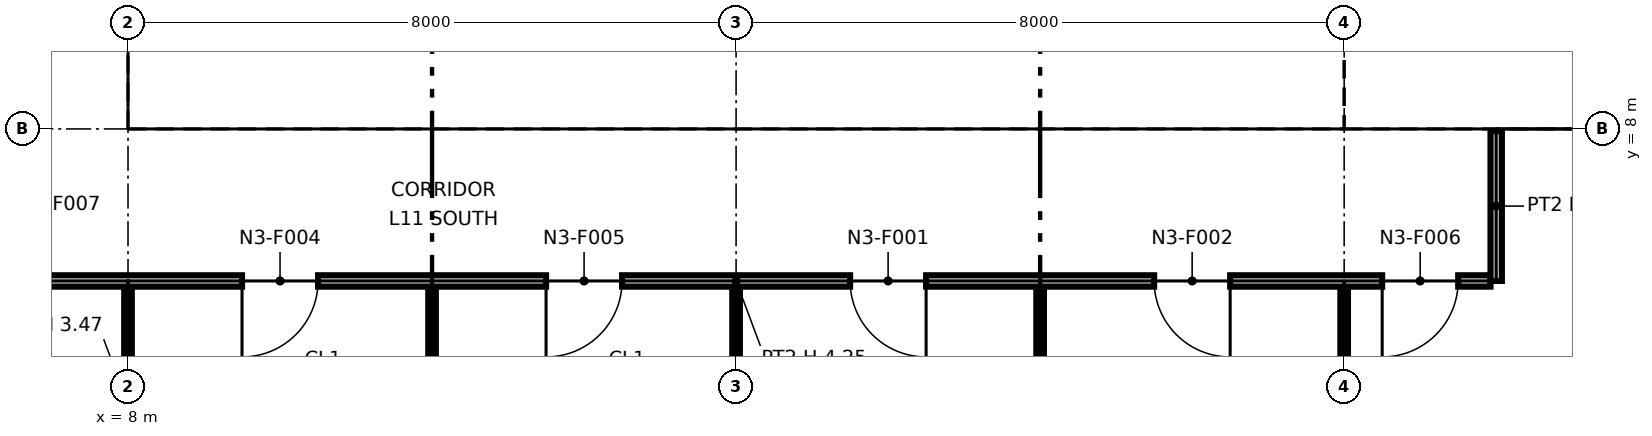
"""IFC4 building model, lengths in metres.
Left out: names, types, materials, properties, quantities, classifications, styles, units other than length and angle.
Written with IfcOpenShell. Run it as: python <this file> out.ifc"""

import sys

from ifc_helpers import new_model, si_unit, direction, frame, frame_2d, origin, origin_2d, place, context, subcontext, project, spatial, polyline, rectangle, i_section, outline, extrude, element, fill, save


model = new_model("IFC4")
c1 = context("Model", 3, precision=1e-05, world=origin(), true_north=direction((0.0, 1.0)))
c2 = subcontext(c1, "Body", "Model", "MODEL_VIEW")
j1 = project(units=[si_unit("LENGTHUNIT", "METRE"), si_unit("PLANEANGLEUNIT", "RADIAN")], contexts=[c1])
p1 = place(None, origin())
s1 = spatial("IfcSite", under=j1, at=p1, CompositionType="ELEMENT")
p2 = place(p1, origin())
s2 = spatial("IfcBuilding", under=s1, at=p2, CompositionType="ELEMENT")
p3 = place(p2, frame((0.0, 0.0, 65.6)))
s3 = spatial("IfcBuildingStorey", under=s2, at=p3, CompositionType="ELEMENT", Elevation=65.6)
for number, where, z_axis, x_axis in (
    (1, (8.0, 8.0, 0.0), (0.0, 0.0, 1.0), (1.0, 0.0, 0.0)),
    (2, (16.0, 8.0, 0.0), (0.0, 0.0, 1.0), (1.0, 0.0, 0.0)),
):
    element("IfcColumn", number, at=place(p3, frame(where, z_axis=z_axis, x_axis=x_axis)), inside=s3, PredefinedType="COLUMN", context=c2, shape_type="SweptSolid", body=[
        extrude(i_section(OverallWidth=0.406, OverallDepth=0.417, WebThickness=0.03, FlangeThickness=0.048, at=origin_2d()), origin(), (0.0, 0.0, 1.0), 4.25),
    ])
p4 = place(p3, frame((24.0, 8.0, 0.0), z_axis=(0.0, 0.0, 1.0), x_axis=(1.0, 0.0, 0.0)))
e3 = element("IfcColumn", 3, at=p4, inside=s3, PredefinedType="COLUMN", context=c2, shape_type="SweptSolid", body=[
    extrude(i_section(OverallWidth=0.411, OverallDepth=0.434, WebThickness=0.036, FlangeThickness=0.057, at=origin_2d()), origin(), (0.0, 0.0, 1.0), 4.25),
])
p5 = place(p3, frame((8.65, 8.75, 0.0), z_axis=(0.0, 0.0, 1.0), x_axis=(1.0, 0.0, 0.0)))
e4 = element("IfcWall", 4, at=p5, inside=s3, PredefinedType="PARTITIONING", context=c2, shape_type="SweptSolid", body=[
    extrude(outline(polyline([(0.0, 0.0), (14.7, 0.0), (14.7, 4.25), (7.469, 4.25), (7.469, 3.632), (7.231, 3.632), (7.23, 4.25), (0.0, 4.25), (0.0, 0.0)])), frame((0.0, 0.1, 0.0), z_axis=(0.0, -1.0, 0.0), x_axis=(1.0, 0.0, 0.0)), (0.0, 0.0, 1.0), 0.2),
])
p6 = place(p5, frame((1.3, 0.0, 0.0)))
e5 = element("IfcOpeningElement", 5, at=p6, cuts=e4, PredefinedType="OPENING", context=c2, shape_type="SweptSolid", body=[
    extrude(rectangle(XDim=1.4, YDim=2.1, at=frame_2d((0.7, 1.05))), frame((0.0, 0.11, 0.0), z_axis=(0.0, -1.0, 0.0), x_axis=(1.0, 0.0, 0.0)), (0.0, 0.0, 1.0), 0.22),
])
p7 = place(p5, frame((4.6, 0.0, 0.0)))
e6 = element("IfcOpeningElement", 6, at=p7, cuts=e4, PredefinedType="OPENING", context=c2, shape_type="SweptSolid", body=[
    extrude(rectangle(XDim=1.4, YDim=2.1, at=frame_2d((0.7, 1.05))), frame((0.0, 0.11, 0.0), z_axis=(0.0, -1.0, 0.0), x_axis=(1.0, 0.0, 0.0)), (0.0, 0.0, 1.0), 0.22),
])
p8 = place(p5, frame((10.4, 0.0, 0.0)))
e7 = element("IfcOpeningElement", 7, at=p8, cuts=e4, PredefinedType="OPENING", context=c2, shape_type="SweptSolid", body=[
    extrude(rectangle(XDim=1.2, YDim=2.1, at=frame_2d((0.6, 1.05))), frame((0.0, 0.11, 0.0), z_axis=(0.0, -1.0, 0.0), x_axis=(1.0, 0.0, 0.0)), (0.0, 0.0, 1.0), 0.22),
])
p9 = place(p3, frame((8.75, 8.85, 0.0), z_axis=(0.0, 0.0, 1.0), x_axis=(0.0, 1.0, 0.0)))
e8 = element("IfcWall", 8, at=p9, inside=s3, PredefinedType="PARTITIONING", context=c2, shape_type="SweptSolid", body=[
    extrude(outline(polyline([(0.0, 0.0), (14.3, 0.0), (14.3, 4.25), (10.231, 4.25), (10.23, 3.789), (10.07, 3.789), (10.069, 4.25), (7.27, 4.25), (7.269, 3.632), (7.031, 3.632), (7.031, 4.25), (0.0, 4.25), (0.0, 0.0)])), frame((0.0, 0.1, 0.0), z_axis=(0.0, -1.0, 0.0), x_axis=(1.0, 0.0, 0.0)), (0.0, 0.0, 1.0), 0.2),
])
p10 = place(p9, frame((8.3, 0.0, 0.0)))
e9 = element("IfcOpeningElement", 9, at=p10, cuts=e8, PredefinedType="OPENING", context=c2, shape_type="SweptSolid", body=[
    extrude(rectangle(XDim=1.8, YDim=2.1, at=frame_2d((0.9, 1.05))), frame((0.0, 0.11, 0.0), z_axis=(0.0, -1.0, 0.0), x_axis=(1.0, 0.0, 0.0)), (0.0, 0.0, 1.0), 0.22),
])
p11 = place(p3, frame((12.4, 8.85, 0.0), z_axis=(0.0, 0.0, 1.0), x_axis=(0.0, 1.0, 0.0)))
e10 = element("IfcWall", 10, at=p11, inside=s3, PredefinedType="PARTITIONING", context=c2, shape_type="SweptSolid", body=[
    extrude(rectangle(XDim=6.85, YDim=0.2, at=frame_2d((3.425, 0.0))), origin(), (0.0, 0.0, 1.0), 4.25),
])
p12 = place(p3, frame((15.85, 8.85, 0.0), z_axis=(0.0, 0.0, 1.0), x_axis=(0.0, 1.0, 0.0)))
e11 = element("IfcWall", 11, at=p12, inside=s3, PredefinedType="PARTITIONING", context=c2, shape_type="SweptSolid", body=[
    extrude(rectangle(XDim=1.55, YDim=0.9, at=frame_2d((0.775, 0.0))), origin(), (0.0, 0.0, 1.0), 3.632),
])
p13 = place(p12, frame((0.3, 0.0, 0.0)))
e12 = element("IfcOpeningElement", 12, at=p13, cuts=e11, PredefinedType="OPENING", context=c2, shape_type="SweptSolid", body=[
    extrude(rectangle(XDim=1.1, YDim=2.1, at=frame_2d((0.55, 1.05))), frame((0.0, 0.46, 0.0), z_axis=(0.0, -1.0, 0.0), x_axis=(1.0, 0.0, 0.0)), (0.0, 0.0, 1.0), 0.92),
])
p14 = place(p3, frame((23.25, 8.85, 0.0), z_axis=(0.0, 0.0, 1.0), x_axis=(0.0, 1.0, 0.0)))
e13 = element("IfcWall", 13, at=p14, inside=s3, PredefinedType="PARTITIONING", context=c2, shape_type="SweptSolid", body=[
    extrude(outline(polyline([(0.0, 0.0), (14.3, 0.0), (14.3, 4.25), (11.231, 4.25), (11.23, 3.789), (11.07, 3.789), (11.069, 4.25), (7.27, 4.25), (7.269, 3.632), (7.031, 3.632), (7.031, 4.25), (1.231, 4.25), (1.23, 3.789), (1.07, 3.789), (1.069, 4.25), (0.0, 4.25), (0.0, 0.0)])), frame((0.0, 0.1, 0.0), z_axis=(0.0, -1.0, 0.0), x_axis=(1.0, 0.0, 0.0)), (0.0, 0.0, 1.0), 0.2),
])
p15 = place(p14, frame((8.3, 0.0, 0.0)))
e14 = element("IfcOpeningElement", 14, at=p15, cuts=e13, PredefinedType="OPENING", context=c2, shape_type="SweptSolid", body=[
    extrude(rectangle(XDim=1.8, YDim=2.1, at=frame_2d((0.9, 1.05))), frame((0.0, 0.11, 0.0), z_axis=(0.0, -1.0, 0.0), x_axis=(1.0, 0.0, 0.0)), (0.0, 0.0, 1.0), 0.22),
])
p16 = place(p3, frame((24.65, 8.75, 0.0), z_axis=(0.0, 0.0, 1.0), x_axis=(1.0, 0.0, 0.0)))
e15 = element("IfcWall", 15, at=p16, inside=s3, PredefinedType="PARTITIONING", context=c2, shape_type="SweptSolid", body=[
    extrude(outline(polyline([(0.0, 0.0), (14.7, 0.0), (14.7, 4.25), (7.469, 4.25), (7.469, 3.632), (7.231, 3.632), (7.23, 4.25), (0.0, 4.25), (0.0, 0.0)])), frame((0.0, 0.1, 0.0), z_axis=(0.0, -1.0, 0.0), x_axis=(1.0, 0.0, 0.0)), (0.0, 0.0, 1.0), 0.2),
])
p17 = place(p3, frame((24.75, 8.85, 0.0), z_axis=(0.0, 0.0, 1.0), x_axis=(0.0, 1.0, 0.0)))
e16 = element("IfcWall", 16, at=p17, inside=s3, PredefinedType="PARTITIONING", context=c2, shape_type="SweptSolid", body=[
    extrude(outline(polyline([(0.0, 0.0), (6.3, 0.0), (6.3, 4.25), (3.231, 4.25), (3.23, 3.789), (3.07, 3.789), (3.069, 4.25), (0.0, 4.25), (0.0, 0.0)])), frame((0.0, 0.1, 0.0), z_axis=(0.0, -1.0, 0.0), x_axis=(1.0, 0.0, 0.0)), (0.0, 0.0, 1.0), 0.2),
])
p18 = place(p3, frame((20.0, 2.5, 0.0), z_axis=(0.0, 0.0, 1.0), x_axis=(0.0, 1.0, 0.0)))
e17 = element("IfcWall", 17, at=p18, inside=s3, PredefinedType="PARTITIONING", context=c2, shape_type="SweptSolid", body=[
    extrude(rectangle(XDim=3.425, YDim=0.1, at=frame_2d((1.712, 0.0))), origin(), (0.0, 0.0, 1.0), 3.47),
])
for number, where, z_axis, x_axis in (
    (18, (8.0, 2.83, 0.0), (0.0, 0.0, 1.0), (0.0, 1.0, 0.0)),
    (19, (12.0, 2.83, 0.0), (0.0, 0.0, 1.0), (0.0, 1.0, 0.0)),
    (20, (16.0, 2.83, 0.0), (0.0, 0.0, 1.0), (0.0, 1.0, 0.0)),
    (21, (24.0, 2.83, 0.0), (0.0, 0.0, 1.0), (0.0, 1.0, 0.0)),
):
    element("IfcWall", number, at=place(p3, frame(where, z_axis=z_axis, x_axis=x_axis)), inside=s3, PredefinedType="PARTITIONING", context=c2, shape_type="SweptSolid", body=[
        extrude(rectangle(XDim=3.095, YDim=0.1, at=frame_2d((1.547, 0.0))), origin(), (0.0, 0.0, 1.0), 3.47),
    ])
p19 = place(p3, frame((6.075, 6.0, 0.0), z_axis=(0.0, 0.0, 1.0), x_axis=(1.0, 0.0, 0.0)))
e22 = element("IfcWall", 22, at=p19, inside=s3, PredefinedType="PARTITIONING", context=c2, shape_type="SweptSolid", body=[
    extrude(rectangle(XDim=19.85, YDim=0.15, at=frame_2d((9.925, 0.0))), origin(), (0.0, 0.0, 1.0), 4.25),
])
p20 = place(p19, frame((12.425, 0.0, 0.0), z_axis=(0.0, 0.0, 1.0), x_axis=(-1.0, 0.0, 0.0)))
e23 = element("IfcOpeningElement", 23, at=p20, cuts=e22, PredefinedType="OPENING", context=c2, shape_type="SweptSolid", body=[
    extrude(rectangle(XDim=1.0, YDim=2.1, at=frame_2d((0.5, 1.05))), frame((0.0, 0.085, 0.0), z_axis=(0.0, -1.0, 0.0), x_axis=(1.0, 0.0, 0.0)), (0.0, 0.0, 1.0), 0.17),
])
p21 = place(p19, frame((16.425, 0.0, 0.0), z_axis=(0.0, 0.0, 1.0), x_axis=(-1.0, 0.0, 0.0)))
e24 = element("IfcOpeningElement", 24, at=p21, cuts=e22, PredefinedType="OPENING", context=c2, shape_type="SweptSolid", body=[
    extrude(rectangle(XDim=1.0, YDim=2.1, at=frame_2d((0.5, 1.05))), frame((0.0, 0.085, 0.0), z_axis=(0.0, -1.0, 0.0), x_axis=(1.0, 0.0, 0.0)), (0.0, 0.0, 1.0), 0.17),
])
p22 = place(p19, frame((4.425, 0.0, 0.0), z_axis=(0.0, 0.0, 1.0), x_axis=(-1.0, 0.0, 0.0)))
e25 = element("IfcOpeningElement", 25, at=p22, cuts=e22, PredefinedType="OPENING", context=c2, shape_type="SweptSolid", body=[
    extrude(rectangle(XDim=1.0, YDim=2.1, at=frame_2d((0.5, 1.05))), frame((0.0, 0.085, 0.0), z_axis=(0.0, -1.0, 0.0), x_axis=(1.0, 0.0, 0.0)), (0.0, 0.0, 1.0), 0.17),
])
p23 = place(p19, frame((8.425, 0.0, 0.0), z_axis=(0.0, 0.0, 1.0), x_axis=(-1.0, 0.0, 0.0)))
e26 = element("IfcOpeningElement", 26, at=p23, cuts=e22, PredefinedType="OPENING", context=c2, shape_type="SweptSolid", body=[
    extrude(rectangle(XDim=1.0, YDim=2.1, at=frame_2d((0.5, 1.05))), frame((0.0, 0.085, 0.0), z_axis=(0.0, -1.0, 0.0), x_axis=(1.0, 0.0, 0.0)), (0.0, 0.0, 1.0), 0.17),
])
p24 = place(p19, frame((19.425, 0.0, 0.0), z_axis=(0.0, 0.0, 1.0), x_axis=(-1.0, 0.0, 0.0)))
e27 = element("IfcOpeningElement", 27, at=p24, cuts=e22, PredefinedType="OPENING", context=c2, shape_type="SweptSolid", body=[
    extrude(rectangle(XDim=1.0, YDim=2.1, at=frame_2d((0.5, 1.05))), frame((0.0, 0.085, 0.0), z_axis=(0.0, -1.0, 0.0), x_axis=(1.0, 0.0, 0.0)), (0.0, 0.0, 1.0), 0.17),
])
p25 = place(p3, frame((26.0, 6.0, 0.0), z_axis=(0.0, 0.0, 1.0), x_axis=(0.0, 1.0, 0.0)))
e28 = element("IfcWall", 28, at=p25, inside=s3, PredefinedType="PARTITIONING", context=c2, shape_type="SweptSolid", body=[
    extrude(rectangle(XDim=1.97, YDim=0.15, at=frame_2d((0.985, 0.0))), origin(), (0.0, 0.0, 1.0), 4.25),
])
p26 = place(p6, origin())
e29 = element("IfcDoor", 29, at=p26, inside=s3, OperationType="DOUBLE_DOOR_SINGLE_SWING", PredefinedType="NOTDEFINED", context=c2, shape_type="SweptSolid", body=[
    extrude(rectangle(XDim=1.4, YDim=2.1, at=frame_2d((0.7, 1.05))), frame((0.0, 0.025, 0.0), z_axis=(0.0, -1.0, 0.0), x_axis=(1.0, 0.0, 0.0)), (0.0, 0.0, 1.0), 0.05),
])
fill(e5, e29)
p27 = place(p7, origin())
e30 = element("IfcDoor", 30, at=p27, inside=s3, OperationType="DOUBLE_DOOR_SINGLE_SWING", PredefinedType="NOTDEFINED", context=c2, shape_type="SweptSolid", body=[
    extrude(rectangle(XDim=1.4, YDim=2.1, at=frame_2d((0.7, 1.05))), frame((0.0, 0.025, 0.0), z_axis=(0.0, -1.0, 0.0), x_axis=(1.0, 0.0, 0.0)), (0.0, 0.0, 1.0), 0.05),
])
fill(e6, e30)
p28 = place(p8, origin())
e31 = element("IfcDoor", 31, at=p28, inside=s3, OperationType="SINGLE_SWING_LEFT", PredefinedType="NOTDEFINED", context=c2, shape_type="SweptSolid", body=[
    extrude(rectangle(XDim=1.2, YDim=2.1, at=frame_2d((0.6, 1.05))), frame((0.0, 0.025, 0.0), z_axis=(0.0, -1.0, 0.0), x_axis=(1.0, 0.0, 0.0)), (0.0, 0.0, 1.0), 0.05),
])
fill(e7, e31)
p29 = place(p20, origin())
e32 = element("IfcDoor", 32, at=p29, inside=s3, OperationType="SINGLE_SWING_LEFT", PredefinedType="DOOR", context=c2, shape_type="SweptSolid", body=[
    extrude(rectangle(XDim=1.0, YDim=2.1, at=frame_2d((0.5, 1.05))), frame((0.0, 0.025, 0.0), z_axis=(0.0, -1.0, 0.0), x_axis=(1.0, 0.0, 0.0)), (0.0, 0.0, 1.0), 0.05),
])
fill(e23, e32)
p30 = place(p21, origin())
e33 = element("IfcDoor", 33, at=p30, inside=s3, OperationType="SINGLE_SWING_LEFT", PredefinedType="DOOR", context=c2, shape_type="SweptSolid", body=[
    extrude(rectangle(XDim=1.0, YDim=2.1, at=frame_2d((0.5, 1.05))), frame((0.0, 0.025, 0.0), z_axis=(0.0, -1.0, 0.0), x_axis=(1.0, 0.0, 0.0)), (0.0, 0.0, 1.0), 0.05),
])
fill(e24, e33)
p31 = place(p22, origin())
e34 = element("IfcDoor", 34, at=p31, inside=s3, OperationType="SINGLE_SWING_RIGHT", PredefinedType="DOOR", context=c2, shape_type="SweptSolid", body=[
    extrude(rectangle(XDim=1.0, YDim=2.1, at=frame_2d((0.5, 1.05))), frame((0.0, 0.025, 0.0), z_axis=(0.0, -1.0, 0.0), x_axis=(1.0, 0.0, 0.0)), (0.0, 0.0, 1.0), 0.05),
])
fill(e25, e34)
p32 = place(p23, origin())
e35 = element("IfcDoor", 35, at=p32, inside=s3, OperationType="SINGLE_SWING_RIGHT", PredefinedType="DOOR", context=c2, shape_type="SweptSolid", body=[
    extrude(rectangle(XDim=1.0, YDim=2.1, at=frame_2d((0.5, 1.05))), frame((0.0, 0.025, 0.0), z_axis=(0.0, -1.0, 0.0), x_axis=(1.0, 0.0, 0.0)), (0.0, 0.0, 1.0), 0.05),
])
fill(e26, e35)
p33 = place(p24, origin())
e36 = element("IfcDoor", 36, at=p33, inside=s3, OperationType="SINGLE_SWING_RIGHT", PredefinedType="DOOR", context=c2, shape_type="SweptSolid", body=[
    extrude(rectangle(XDim=1.0, YDim=2.1, at=frame_2d((0.5, 1.05))), frame((0.0, 0.025, 0.0), z_axis=(0.0, -1.0, 0.0), x_axis=(1.0, 0.0, 0.0)), (0.0, 0.0, 1.0), 0.05),
])
fill(e27, e36)
save(model, sys.argv[1])
